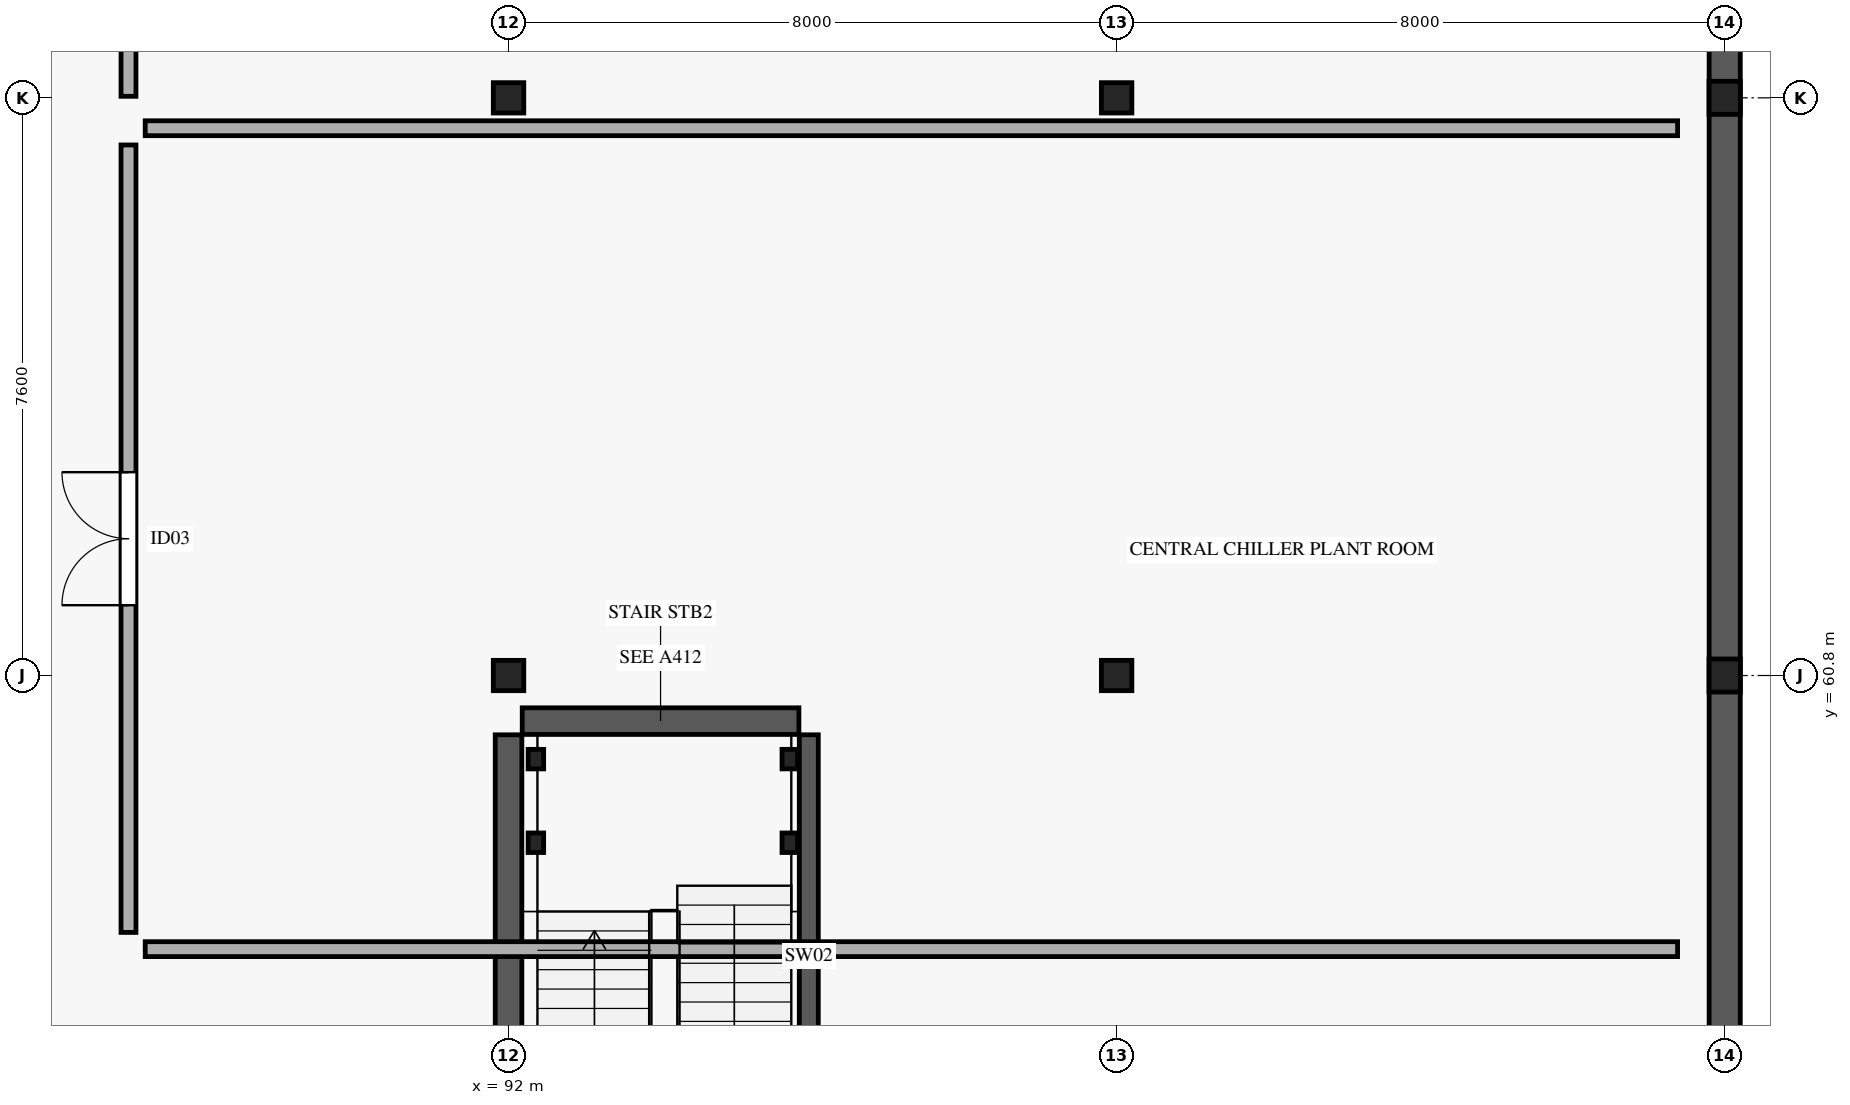
"""IFC4 building model, lengths in metres.
Left out: names, types, materials, properties, quantities, classifications, styles, units other than length and angle.
Written with IfcOpenShell. Run it as: python <this file> out.ifc"""

import sys

from ifc_helpers import new_model, si_unit, direction, frame, frame_2d, origin, origin_2d, place, context, subcontext, project, spatial, rectangle, i_section, extrude, element, fill, save


model = new_model("IFC4")
c1 = context("Model", 3, precision=1e-05, world=origin(), true_north=direction((0.0, 1.0)))
c2 = subcontext(c1, "Body", "Model", "MODEL_VIEW")
j1 = project(units=[si_unit("LENGTHUNIT", "METRE"), si_unit("PLANEANGLEUNIT", "RADIAN")], contexts=[c1])
p1 = place(None, origin())
s1 = spatial("IfcSite", under=j1, at=p1, CompositionType="ELEMENT")
p2 = place(p1, origin())
s2 = spatial("IfcBuilding", under=s1, at=p2, CompositionType="ELEMENT")
p3 = place(p2, frame((0.0, 0.0, -4.8)))
s3 = spatial("IfcBuildingStorey", under=s2, at=p3, CompositionType="ELEMENT", Elevation=-4.8)
for number, where, z_axis, x_axis in (
    (1, (92.0, 60.8, 0.0), (0.0, 0.0, 1.0), (1.0, 0.0, 0.0)),
    (2, (92.0, 68.4, 0.0), (0.0, 0.0, 1.0), (1.0, 0.0, 0.0)),
    (3, (100.0, 60.8, 0.0), (0.0, 0.0, 1.0), (1.0, 0.0, 0.0)),
    (4, (100.0, 68.4, 0.0), (0.0, 0.0, 1.0), (1.0, 0.0, 0.0)),
):
    element("IfcColumn", number, at=place(p3, frame(where, z_axis=z_axis, x_axis=x_axis)), inside=s3, PredefinedType="COLUMN", context=c2, shape_type="SweptSolid", body=[
        extrude(i_section(OverallWidth=0.401, OverallDepth=0.399, WebThickness=0.025, FlangeThickness=0.04, FilletRadius=0.015, at=origin_2d()), origin(), (0.0, 0.0, 1.0), 4.58),
    ])
for number, where, z_axis, x_axis in (
    (5, (108.0, 60.8, 0.0), (0.0, 0.0, 1.0), (1.0, 0.0, 0.0)),
    (6, (108.0, 68.4, 0.0), (0.0, 0.0, 1.0), (1.0, 0.0, 0.0)),
):
    element("IfcColumn", number, at=place(p3, frame(where, z_axis=z_axis, x_axis=x_axis)), inside=s3, PredefinedType="COLUMN", context=c2, shape_type="SweptSolid", body=[
        extrude(i_section(OverallWidth=0.412, OverallDepth=0.435, WebThickness=0.036, FlangeThickness=0.057, FilletRadius=0.015, at=origin_2d()), origin(), (0.0, 0.0, 1.0), 4.58),
    ])
p4 = place(p3, frame((108.0, 46.205, 0.0), z_axis=(0.0, 0.0, 1.0), x_axis=(0.0, 1.0, 0.0)))
e7 = element("IfcWall", 7, at=p4, inside=s3, PredefinedType="USERDEFINED", context=c2, shape_type="SweptSolid", body=[
    extrude(rectangle(XDim=67.59, YDim=0.41, at=frame_2d((33.795, 0.0))), origin(), (0.0, 0.0, 1.0), 4.58),
])
p5 = place(p3, frame((92.0, 54.2, 0.0), z_axis=(0.0, 0.0, 1.0), x_axis=(0.0, 1.0, 0.0)))
e8 = element("IfcWall", 8, at=p5, inside=s3, PredefinedType="SHEAR", context=c2, shape_type="SweptSolid", body=[
    extrude(rectangle(XDim=5.82, YDim=0.35, at=frame_2d((2.91, 0.0))), origin(), (0.0, 0.0, 1.0), 4.58),
])
p6 = place(p3, frame((95.95, 54.2, 0.0), z_axis=(0.0, 0.0, 1.0), x_axis=(0.0, 1.0, 0.0)))
e9 = element("IfcWall", 9, at=p6, inside=s3, PredefinedType="SHEAR", context=c2, shape_type="SweptSolid", body=[
    extrude(rectangle(XDim=5.82, YDim=0.25, at=frame_2d((2.91, 0.0))), origin(), (0.0, 0.0, 1.0), 4.58),
])
p7 = place(p3, frame((92.18, 60.2, 0.0), z_axis=(0.0, 0.0, 1.0), x_axis=(1.0, 0.0, 0.0)))
e10 = element("IfcWall", 10, at=p7, inside=s3, PredefinedType="SHEAR", context=c2, shape_type="SweptSolid", body=[
    extrude(rectangle(XDim=3.64, YDim=0.35, at=frame_2d((1.82, 0.0))), origin(), (0.0, 0.0, 1.0), 4.58),
])
for number, where, z_axis, x_axis in (
    (11, (92.36, 58.6, 0.0), (0.0, 0.0, 1.0), (1.0, 0.0, 0.0)),
    (12, (95.7, 58.6, 0.0), (0.0, 0.0, 1.0), (1.0, 0.0, 0.0)),
    (13, (92.36, 59.7, 0.0), (0.0, 0.0, 1.0), (1.0, 0.0, 0.0)),
    (14, (95.7, 59.7, 0.0), (0.0, 0.0, 1.0), (1.0, 0.0, 0.0)),
):
    element("IfcColumn", number, at=place(p3, frame(where, z_axis=z_axis, x_axis=x_axis)), inside=s3, PredefinedType="COLUMN", context=c2, shape_type="SweptSolid", body=[
        extrude(i_section(OverallWidth=0.204, OverallDepth=0.257, WebThickness=0.009, FlangeThickness=0.016, FilletRadius=0.013, at=origin_2d()), origin(), (0.0, 0.0, 1.0), 4.795),
    ])
p8 = place(p3, frame((87.0, 57.42, 0.0), z_axis=(0.0, 0.0, 1.0), x_axis=(0.0, 1.0, 0.0)))
e15 = element("IfcWall", 15, at=p8, inside=s3, PredefinedType="PARTITIONING", context=c2, shape_type="SweptSolid", body=[
    extrude(rectangle(XDim=10.36, YDim=0.196, at=frame_2d((5.18, 0.0))), origin(), (0.0, 0.0, 1.0), 3.45),
])
p9 = place(p8, frame((4.305, 0.0, 0.0)))
e16 = element("IfcOpeningElement", 16, at=p9, cuts=e15, PredefinedType="OPENING", context=c2, shape_type="SweptSolid", body=[
    extrude(rectangle(XDim=1.75, YDim=2.35, at=frame_2d((0.875, 1.175))), frame((0.0, 0.108, 0.0), z_axis=(0.0, -1.0, 0.0), x_axis=(1.0, 0.0, 0.0)), (0.0, 0.0, 1.0), 0.216),
])
for number, where, z_axis, x_axis in (
    (17, (87.22, 68.0, 0.0), (0.0, 0.0, 1.0), (1.0, 0.0, 0.0)),
    (18, (87.22, 57.2, 0.0), (0.0, 0.0, 1.0), (1.0, 0.0, 0.0)),
):
    element("IfcWall", number, at=place(p3, frame(where, z_axis=z_axis, x_axis=x_axis)), inside=s3, PredefinedType="PARTITIONING", context=c2, shape_type="SweptSolid", body=[
        extrude(rectangle(XDim=20.16, YDim=0.196, at=frame_2d((10.08, 0.0))), origin(), (0.0, 0.0, 1.0), 3.45),
    ])
p10 = place(p3, frame((87.0, 68.42, 0.0), z_axis=(0.0, 0.0, 1.0), x_axis=(0.0, 1.0, 0.0)))
e19 = element("IfcWall", 19, at=p10, inside=s3, PredefinedType="PARTITIONING", context=c2, shape_type="SweptSolid", body=[
    extrude(rectangle(XDim=7.56, YDim=0.196, at=frame_2d((3.78, 0.0))), origin(), (0.0, 0.0, 1.0), 3.45),
])
p11 = place(p9, origin())
e20 = element("IfcDoor", 20, at=p11, inside=s3, OperationType="DOUBLE_DOOR_SINGLE_SWING", PredefinedType="DOOR", context=c2, shape_type="SweptSolid", body=[
    extrude(rectangle(XDim=1.75, YDim=2.35, at=frame_2d((0.875, 1.175))), frame((0.0, 0.025, 0.0), z_axis=(0.0, -1.0, 0.0), x_axis=(1.0, 0.0, 0.0)), (0.0, 0.0, 1.0), 0.05),
])
fill(e16, e20)
save(model, sys.argv[1])
